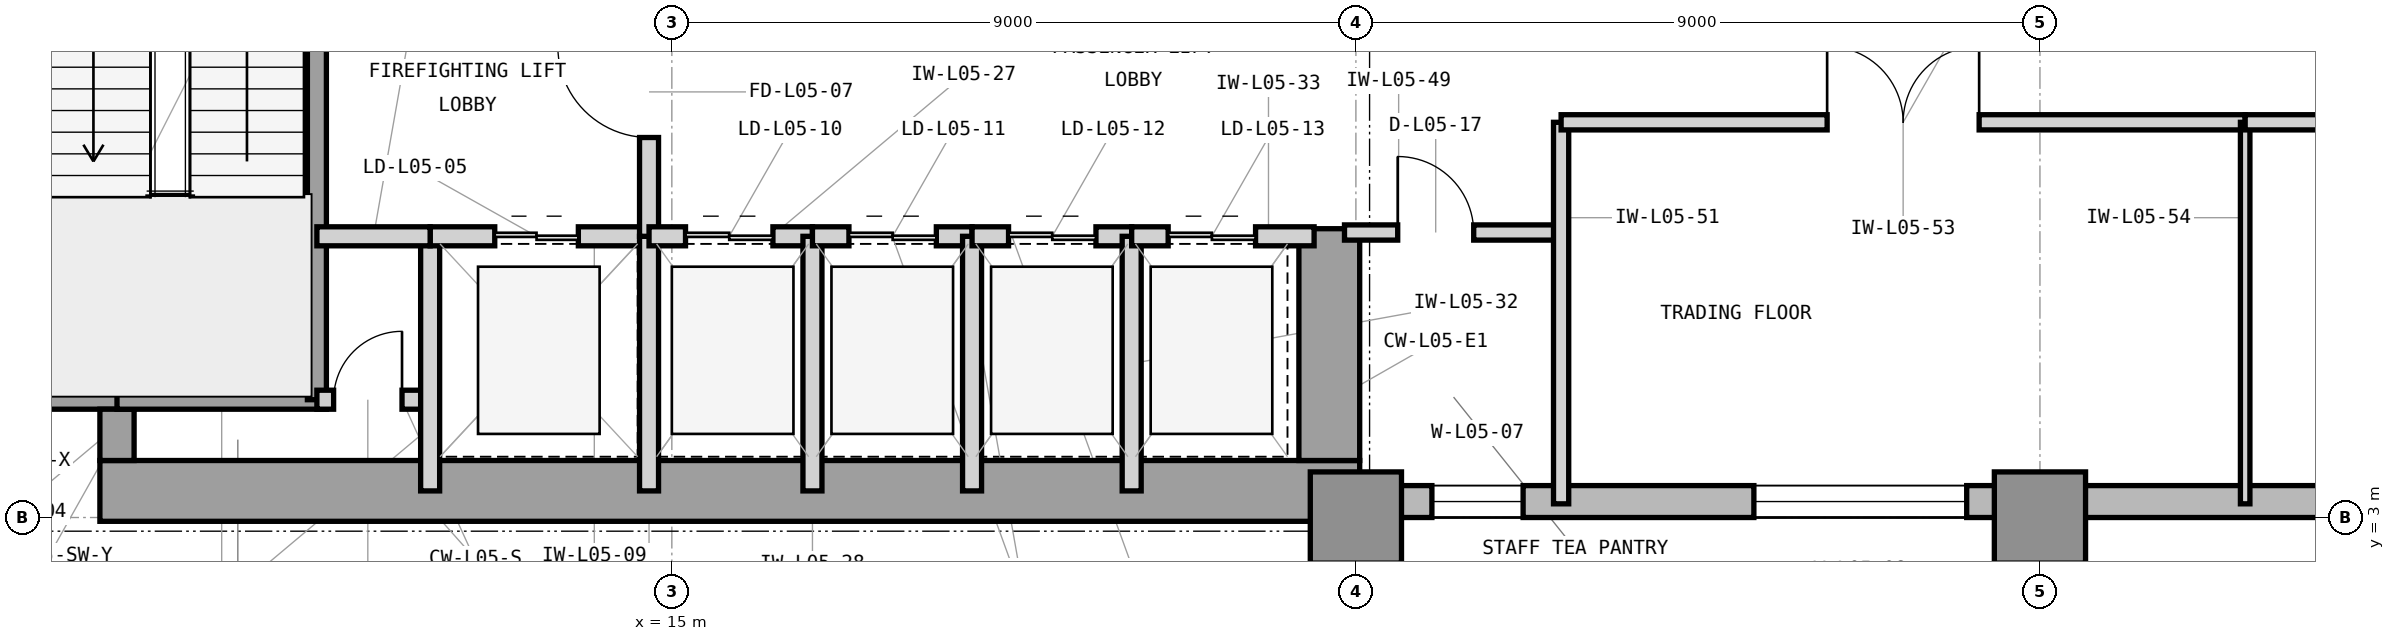
"""IFC4 building model, lengths in metres.
Left out: names, types, materials, properties, quantities, classifications, styles, units other than length and angle.
Written with IfcOpenShell. Run it as: python <this file> out.ifc"""

import sys

from ifc_helpers import new_model, si_unit, direction, frame, frame_2d, origin, origin_2d, place, context, subcontext, project, spatial, rectangle, extrude, element, fill, save


model = new_model("IFC4")
c1 = context("Model", 3, precision=1e-05, world=origin(), true_north=direction((0.0, 1.0)))
c2 = subcontext(c1, "Body", "Model", "MODEL_VIEW")
j1 = project(units=[si_unit("LENGTHUNIT", "METRE"), si_unit("PLANEANGLEUNIT", "RADIAN")], contexts=[c1])
p1 = place(None, origin())
s1 = spatial("IfcSite", under=j1, at=p1, CompositionType="ELEMENT")
p2 = place(p1, origin())
s2 = spatial("IfcBuilding", under=s1, at=p2, CompositionType="ELEMENT")
p3 = place(p2, frame((0.0, 0.0, 25.8)))
s3 = spatial("IfcBuildingStorey", under=s2, at=p3, CompositionType="ELEMENT", Elevation=25.8)
p4 = place(p3, frame((7.475, 3.35, 0.0), z_axis=(0.0, 0.0, 1.0), x_axis=(1.0, 0.0, 0.0)))
e1 = element("IfcWall", 1, at=p4, inside=s3, PredefinedType="SHEAR", context=c2, shape_type="SweptSolid", body=[
    extrude(rectangle(XDim=16.575, YDim=0.8, at=frame_2d((8.288, 0.0))), origin(), (0.0, 0.0, 1.0), 4.2),
])
p5 = place(p3, frame((23.65, 3.75, 0.0), z_axis=(0.0, 0.0, 1.0), x_axis=(0.0, 1.0, 0.0)))
e2 = element("IfcWall", 2, at=p5, inside=s3, PredefinedType="SHEAR", context=c2, shape_type="SweptSolid", body=[
    extrude(rectangle(XDim=3.05, YDim=0.8, at=frame_2d((1.525, 0.0))), origin(), (0.0, 0.0, 1.0), 4.2),
])
p6 = place(p3, frame((6.75, 4.65, 0.0), z_axis=(0.0, 0.0, 1.0), x_axis=(1.0, 0.0, 0.0)))
e3 = element("IfcWall", 3, at=p6, inside=s3, PredefinedType="SHEAR", context=c2, shape_type="SweptSolid", body=[
    extrude(rectangle(XDim=1.175, YDim=0.45, at=frame_2d((0.587, 0.0))), origin(), (0.0, 0.0, 1.0), 4.2),
])
p7 = place(p3, frame((7.7, 3.75, 0.0), z_axis=(0.0, 0.0, 1.0), x_axis=(0.0, 1.0, 0.0)))
e4 = element("IfcWall", 4, at=p7, inside=s3, PredefinedType="SHEAR", context=c2, shape_type="SweptSolid", body=[
    extrude(rectangle(XDim=0.675, YDim=0.45, at=frame_2d((0.337, 0.0))), origin(), (0.0, 0.0, 1.0), 4.2),
])
for number, where, z_axis, x_axis in (
    (5, (24.0, 3.0, 0.0), (0.0, 0.0, 1.0), (1.0, 0.0, 0.0)),
    (6, (33.0, 3.0, 0.0), (0.0, 0.0, 1.0), (1.0, 0.0, 0.0)),
):
    element("IfcColumn", number, at=place(p3, frame(where, z_axis=z_axis, x_axis=x_axis)), inside=s3, PredefinedType="COLUMN", context=c2, shape_type="SweptSolid", body=[
        extrude(rectangle(XDim=1.2, YDim=1.2, at=origin_2d()), origin(), (0.0, 0.0, 1.0), 4.2),
    ])
p8 = place(p3, frame((23.9, 3.21, 0.0), z_axis=(0.0, 0.0, 1.0), x_axis=(1.0, 0.0, 0.0)))
e7 = element("IfcWall", 7, at=p8, inside=s3, PredefinedType="STANDARD", context=c2, shape_type="SweptSolid", body=[
    extrude(rectangle(XDim=40.5, YDim=0.42, at=frame_2d((20.25, 0.0))), origin(), (0.0, 0.0, 1.0), 3.98),
])
p9 = place(p8, frame((1.1, 0.0, 0.85)))
e8 = element("IfcOpeningElement", 8, at=p9, cuts=e7, PredefinedType="OPENING", context=c2, shape_type="SweptSolid", body=[
    extrude(rectangle(XDim=1.2, YDim=2.45, at=frame_2d((0.6, 1.225))), frame((0.0, 0.22, 0.0), z_axis=(0.0, -1.0, 0.0), x_axis=(1.0, 0.0, 0.0)), (0.0, 0.0, 1.0), 0.44),
])
p10 = place(p8, frame((5.336, 0.0, 0.85)))
e9 = element("IfcOpeningElement", 9, at=p10, cuts=e7, PredefinedType="OPENING", context=c2, shape_type="SweptSolid", body=[
    extrude(rectangle(XDim=2.8, YDim=2.45, at=frame_2d((1.4, 1.225))), frame((0.0, 0.22, 0.0), z_axis=(0.0, -1.0, 0.0), x_axis=(1.0, 0.0, 0.0)), (0.0, 0.0, 1.0), 0.44),
])
p11 = place(p8, frame((14.336, 0.0, 0.85)))
e10 = element("IfcOpeningElement", 10, at=p11, cuts=e7, PredefinedType="OPENING", context=c2, shape_type="SweptSolid", body=[
    extrude(rectangle(XDim=2.8, YDim=2.45, at=frame_2d((1.4, 1.225))), frame((0.0, 0.22, 0.0), z_axis=(0.0, -1.0, 0.0), x_axis=(1.0, 0.0, 0.0)), (0.0, 0.0, 1.0), 0.44),
])
p12 = place(p8, frame((21.086, 0.0, 0.85)))
e11 = element("IfcOpeningElement", 11, at=p12, cuts=e7, PredefinedType="OPENING", context=c2, shape_type="SweptSolid", body=[
    extrude(rectangle(XDim=2.1, YDim=2.45, at=frame_2d((1.05, 1.225))), frame((0.0, 0.22, 0.0), z_axis=(0.0, -1.0, 0.0), x_axis=(1.0, 0.0, 0.0)), (0.0, 0.0, 1.0), 0.44),
])
p13 = place(p3, frame((7.7, 4.55, 0.0), z_axis=(0.0, 0.0, 1.0), x_axis=(1.0, 0.0, 0.0)))
e12 = element("IfcWall", 12, at=p13, inside=s3, PredefinedType="SHEAR", context=c2, shape_type="SweptSolid", body=[
    extrude(rectangle(XDim=2.755, YDim=0.25, at=frame_2d((1.377, 0.0))), origin(), (0.0, 0.0, 1.0), 4.2),
])
p14 = place(p3, frame((10.33, 4.55, 0.0), z_axis=(0.0, 0.0, 1.0), x_axis=(0.0, 1.0, 0.0)))
e13 = element("IfcWall", 13, at=p14, inside=s3, PredefinedType="SHEAR", context=c2, shape_type="SweptSolid", body=[
    extrude(rectangle(XDim=7.45, YDim=0.25, at=frame_2d((3.725, 0.0))), origin(), (0.0, 0.0, 1.0), 4.2),
])
p15 = place(p14, frame((5.9, 0.0, 0.0)))
e14 = element("IfcOpeningElement", 14, at=p15, cuts=e13, PredefinedType="OPENING", context=c2, shape_type="SweptSolid", body=[
    extrude(rectangle(XDim=1.25, YDim=2.2, at=frame_2d((0.625, 1.1))), frame((0.0, 0.135, 0.0), z_axis=(0.0, -1.0, 0.0), x_axis=(1.0, 0.0, 0.0)), (0.0, 0.0, 1.0), 0.27),
])
p16 = place(p3, frame((10.33, 4.55, 0.0), z_axis=(0.0, 0.0, 1.0), x_axis=(1.0, 0.0, 0.0)))
e15 = element("IfcWall", 15, at=p16, inside=s3, PredefinedType="PARTITIONING", context=c2, shape_type="SweptSolid", body=[
    extrude(rectangle(XDim=1.49, YDim=0.25, at=frame_2d((0.745, 0.0))), origin(), (0.0, 0.0, 1.0), 3.97),
])
p17 = place(p16, frame((0.22, 0.0, 0.0)))
e16 = element("IfcOpeningElement", 16, at=p17, cuts=e15, PredefinedType="OPENING", context=c2, shape_type="SweptSolid", body=[
    extrude(rectangle(XDim=0.9, YDim=2.1, at=frame_2d((0.45, 1.05))), frame((0.0, 0.135, 0.0), z_axis=(0.0, -1.0, 0.0), x_axis=(1.0, 0.0, 0.0)), (0.0, 0.0, 1.0), 0.27),
])
p18 = place(p3, frame((11.82, 3.35, 0.0), z_axis=(0.0, 0.0, 1.0), x_axis=(0.0, 1.0, 0.0)))
e17 = element("IfcWall", 17, at=p18, inside=s3, PredefinedType="PARTITIONING", context=c2, shape_type="SweptSolid", body=[
    extrude(rectangle(XDim=3.35, YDim=0.25, at=frame_2d((1.675, 0.0))), origin(), (0.0, 0.0, 1.0), 3.97),
])
p19 = place(p3, frame((11.82, 6.7, 0.0), z_axis=(0.0, 0.0, 1.0), x_axis=(1.0, 0.0, 0.0)))
e18 = element("IfcWall", 18, at=p19, inside=s3, PredefinedType="PARTITIONING", context=c2, shape_type="SweptSolid", body=[
    extrude(rectangle(XDim=2.88, YDim=0.25, at=frame_2d((1.44, 0.0))), origin(), (0.0, 0.0, 1.0), 3.426),
])
p20 = place(p19, frame((0.85, 0.0, 0.0)))
e19 = element("IfcOpeningElement", 19, at=p20, cuts=e18, PredefinedType="OPENING", context=c2, shape_type="SweptSolid", body=[
    extrude(rectangle(XDim=1.1, YDim=2.25, at=frame_2d((0.55, 1.125))), frame((0.0, 0.135, 0.0), z_axis=(0.0, -1.0, 0.0), x_axis=(1.0, 0.0, 0.0)), (0.0, 0.0, 1.0), 0.27),
])
p21 = place(p3, frame((14.7, 3.35, 0.0), z_axis=(0.0, 0.0, 1.0), x_axis=(0.0, 1.0, 0.0)))
e20 = element("IfcWall", 20, at=p21, inside=s3, PredefinedType="PARTITIONING", context=c2, shape_type="SweptSolid", body=[
    extrude(rectangle(XDim=3.35, YDim=0.25, at=frame_2d((1.675, 0.0))), origin(), (0.0, 0.0, 1.0), 3.97),
])
p22 = place(p3, frame((14.7, 6.7, 0.0), z_axis=(0.0, 0.0, 1.0), x_axis=(0.0, 1.0, 0.0)))
e21 = element("IfcWall", 21, at=p22, inside=s3, PredefinedType="PARTITIONING", context=c2, shape_type="SweptSolid", body=[
    extrude(rectangle(XDim=3.8, YDim=0.25, at=frame_2d((1.9, 0.0))), origin(), (0.0, 0.0, 1.0), 3.97),
])
p23 = place(p22, frame((1.3, 0.0, 0.0)))
e22 = element("IfcOpeningElement", 22, at=p23, cuts=e21, PredefinedType="OPENING", context=c2, shape_type="SweptSolid", body=[
    extrude(rectangle(XDim=1.2, YDim=2.2, at=frame_2d((0.6, 1.1))), frame((0.0, 0.135, 0.0), z_axis=(0.0, -1.0, 0.0), x_axis=(1.0, 0.0, 0.0)), (0.0, 0.0, 1.0), 0.27),
])
p24 = place(p3, frame((10.33, 6.7, 0.0), z_axis=(0.0, 0.0, 1.0), x_axis=(1.0, 0.0, 0.0)))
e23 = element("IfcWall", 23, at=p24, inside=s3, PredefinedType="PARTITIONING", context=c2, shape_type="SweptSolid", body=[
    extrude(rectangle(XDim=1.49, YDim=0.25, at=frame_2d((0.745, 0.0))), origin(), (0.0, 0.0, 1.0), 3.426),
])
p25 = place(p3, frame((14.7, 6.7, 0.0), z_axis=(0.0, 0.0, 1.0), x_axis=(1.0, 0.0, 0.0)))
e24 = element("IfcWall", 24, at=p25, inside=s3, PredefinedType="PARTITIONING", context=c2, shape_type="SweptSolid", body=[
    extrude(rectangle(XDim=2.15, YDim=0.25, at=frame_2d((1.075, 0.0))), origin(), (0.0, 0.0, 1.0), 3.426),
])
p26 = place(p25, frame((0.48, 0.0, 0.0)))
e25 = element("IfcOpeningElement", 25, at=p26, cuts=e24, PredefinedType="OPENING", context=c2, shape_type="SweptSolid", body=[
    extrude(rectangle(XDim=1.15, YDim=2.25, at=frame_2d((0.575, 1.125))), frame((0.0, 0.135, 0.0), z_axis=(0.0, -1.0, 0.0), x_axis=(1.0, 0.0, 0.0)), (0.0, 0.0, 1.0), 0.27),
])
p27 = place(p3, frame((16.85, 3.35, 0.0), z_axis=(0.0, 0.0, 1.0), x_axis=(0.0, 1.0, 0.0)))
e26 = element("IfcWall", 26, at=p27, inside=s3, PredefinedType="PARTITIONING", context=c2, shape_type="SweptSolid", body=[
    extrude(rectangle(XDim=3.35, YDim=0.25, at=frame_2d((1.675, 0.0))), origin(), (0.0, 0.0, 1.0), 3.97),
])
p28 = place(p3, frame((16.85, 6.7, 0.0), z_axis=(0.0, 0.0, 1.0), x_axis=(1.0, 0.0, 0.0)))
e27 = element("IfcWall", 27, at=p28, inside=s3, PredefinedType="PARTITIONING", context=c2, shape_type="SweptSolid", body=[
    extrude(rectangle(XDim=2.1, YDim=0.25, at=frame_2d((1.05, 0.0))), origin(), (0.0, 0.0, 1.0), 3.426),
])
p29 = place(p28, frame((0.48, 0.0, 0.0)))
e28 = element("IfcOpeningElement", 28, at=p29, cuts=e27, PredefinedType="OPENING", context=c2, shape_type="SweptSolid", body=[
    extrude(rectangle(XDim=1.15, YDim=2.25, at=frame_2d((0.575, 1.125))), frame((0.0, 0.135, 0.0), z_axis=(0.0, -1.0, 0.0), x_axis=(1.0, 0.0, 0.0)), (0.0, 0.0, 1.0), 0.27),
])
p30 = place(p3, frame((18.95, 3.35, 0.0), z_axis=(0.0, 0.0, 1.0), x_axis=(0.0, 1.0, 0.0)))
e29 = element("IfcWall", 29, at=p30, inside=s3, PredefinedType="PARTITIONING", context=c2, shape_type="SweptSolid", body=[
    extrude(rectangle(XDim=3.35, YDim=0.25, at=frame_2d((1.675, 0.0))), origin(), (0.0, 0.0, 1.0), 3.97),
])
p31 = place(p3, frame((18.95, 6.7, 0.0), z_axis=(0.0, 0.0, 1.0), x_axis=(1.0, 0.0, 0.0)))
e30 = element("IfcWall", 30, at=p31, inside=s3, PredefinedType="PARTITIONING", context=c2, shape_type="SweptSolid", body=[
    extrude(rectangle(XDim=2.1, YDim=0.25, at=frame_2d((1.05, 0.0))), origin(), (0.0, 0.0, 1.0), 3.426),
])
p32 = place(p31, frame((0.48, 0.0, 0.0)))
e31 = element("IfcOpeningElement", 31, at=p32, cuts=e30, PredefinedType="OPENING", context=c2, shape_type="SweptSolid", body=[
    extrude(rectangle(XDim=1.15, YDim=2.25, at=frame_2d((0.575, 1.125))), frame((0.0, 0.135, 0.0), z_axis=(0.0, -1.0, 0.0), x_axis=(1.0, 0.0, 0.0)), (0.0, 0.0, 1.0), 0.27),
])
p33 = place(p3, frame((21.05, 3.35, 0.0), z_axis=(0.0, 0.0, 1.0), x_axis=(0.0, 1.0, 0.0)))
e32 = element("IfcWall", 32, at=p33, inside=s3, PredefinedType="PARTITIONING", context=c2, shape_type="SweptSolid", body=[
    extrude(rectangle(XDim=3.35, YDim=0.25, at=frame_2d((1.675, 0.0))), origin(), (0.0, 0.0, 1.0), 3.97),
])
p34 = place(p3, frame((21.05, 6.7, 0.0), z_axis=(0.0, 0.0, 1.0), x_axis=(1.0, 0.0, 0.0)))
e33 = element("IfcWall", 33, at=p34, inside=s3, PredefinedType="PARTITIONING", context=c2, shape_type="SweptSolid", body=[
    extrude(rectangle(XDim=2.4, YDim=0.25, at=frame_2d((1.2, 0.0))), origin(), (0.0, 0.0, 1.0), 3.426),
])
p35 = place(p34, frame((0.48, 0.0, 0.0)))
e34 = element("IfcOpeningElement", 34, at=p35, cuts=e33, PredefinedType="OPENING", context=c2, shape_type="SweptSolid", body=[
    extrude(rectangle(XDim=1.15, YDim=2.25, at=frame_2d((0.575, 1.125))), frame((0.0, 0.135, 0.0), z_axis=(0.0, -1.0, 0.0), x_axis=(1.0, 0.0, 0.0)), (0.0, 0.0, 1.0), 0.27),
])
p36 = place(p3, frame((23.85, 6.75, 0.0), z_axis=(0.0, 0.0, 1.0), x_axis=(1.0, 0.0, 0.0)))
e35 = element("IfcWall", 35, at=p36, inside=s3, PredefinedType="PARTITIONING", context=c2, shape_type="SweptSolid", body=[
    extrude(rectangle(XDim=2.85, YDim=0.2, at=frame_2d((1.425, 0.0))), origin(), (0.0, 0.0, 1.0), 3.97),
])
p37 = place(p36, frame((0.7, 0.0, 0.0)))
e36 = element("IfcOpeningElement", 36, at=p37, cuts=e35, PredefinedType="OPENING", context=c2, shape_type="SweptSolid", body=[
    extrude(rectangle(XDim=1.0, YDim=2.15, at=frame_2d((0.5, 1.075))), frame((0.0, 0.11, 0.0), z_axis=(0.0, -1.0, 0.0), x_axis=(1.0, 0.0, 0.0)), (0.0, 0.0, 1.0), 0.22),
])
p38 = place(p3, frame((26.7, 3.18, 0.0), z_axis=(0.0, 0.0, 1.0), x_axis=(0.0, 1.0, 0.0)))
e37 = element("IfcWall", 37, at=p38, inside=s3, PredefinedType="PARTITIONING", context=c2, shape_type="SweptSolid", body=[
    extrude(rectangle(XDim=5.02, YDim=0.2, at=frame_2d((2.51, 0.0))), origin(), (0.0, 0.0, 1.0), 3.97),
])
p39 = place(p3, frame((26.7, 8.2, 0.0), z_axis=(0.0, 0.0, 1.0), x_axis=(1.0, 0.0, 0.0)))
e38 = element("IfcWall", 38, at=p39, inside=s3, PredefinedType="PARTITIONING", context=c2, shape_type="SweptSolid", body=[
    extrude(rectangle(XDim=9.0, YDim=0.2, at=frame_2d((4.5, 0.0))), origin(), (0.0, 0.0, 1.0), 3.97),
])
p40 = place(p39, frame((3.5, 0.0, 0.0)))
e39 = element("IfcOpeningElement", 39, at=p40, cuts=e38, PredefinedType="OPENING", context=c2, shape_type="SweptSolid", body=[
    extrude(rectangle(XDim=2.0, YDim=2.5, at=frame_2d((1.0, 1.25))), frame((0.0, 0.11, 0.0), z_axis=(0.0, -1.0, 0.0), x_axis=(1.0, 0.0, 0.0)), (0.0, 0.0, 1.0), 0.22),
])
p41 = place(p3, frame((35.7, 3.18, 0.0), z_axis=(0.0, 0.0, 1.0), x_axis=(0.0, 1.0, 0.0)))
e40 = element("IfcWall", 40, at=p41, inside=s3, PredefinedType="PARTITIONING", context=c2, shape_type="SweptSolid", body=[
    extrude(rectangle(XDim=5.02, YDim=0.125, at=frame_2d((2.51, 0.0))), origin(), (0.0, 0.0, 1.0), 3.97),
])
p42 = place(p3, frame((35.7, 8.2, 0.0), z_axis=(0.0, 0.0, 1.0), x_axis=(1.0, 0.0, 0.0)))
e41 = element("IfcWall", 41, at=p42, inside=s3, PredefinedType="PARTITIONING", context=c2, shape_type="SweptSolid", body=[
    extrude(rectangle(XDim=9.0, YDim=0.2, at=frame_2d((4.5, 0.0))), origin(), (0.0, 0.0, 1.0), 3.97),
])
p43 = place(p42, frame((3.5, 0.0, 0.0)))
e42 = element("IfcOpeningElement", 42, at=p43, cuts=e41, PredefinedType="OPENING", context=c2, shape_type="SweptSolid", body=[
    extrude(rectangle(XDim=2.0, YDim=2.5, at=frame_2d((1.0, 1.25))), frame((0.0, 0.11, 0.0), z_axis=(0.0, -1.0, 0.0), x_axis=(1.0, 0.0, 0.0)), (0.0, 0.0, 1.0), 0.22),
])
p44 = place(p17, origin())
e43 = element("IfcDoor", 43, at=p44, inside=s3, OperationType="SINGLE_SWING_RIGHT", PredefinedType="TRAPDOOR", context=c2, shape_type="SweptSolid", body=[
    extrude(rectangle(XDim=0.9, YDim=2.1, at=frame_2d((0.45, 1.05))), frame((0.0, 0.025, 0.0), z_axis=(0.0, -1.0, 0.0), x_axis=(1.0, 0.0, 0.0)), (0.0, 0.0, 1.0), 0.05),
])
fill(e16, e43)
p45 = place(p20, origin())
e44 = element("IfcDoor", 44, at=p45, inside=s3, OperationType="DOUBLE_DOOR_SLIDING", PredefinedType="DOOR", context=c2, shape_type="SweptSolid", body=[
    extrude(rectangle(XDim=1.1, YDim=2.25, at=frame_2d((0.55, 1.125))), frame((0.0, 0.025, 0.0), z_axis=(0.0, -1.0, 0.0), x_axis=(1.0, 0.0, 0.0)), (0.0, 0.0, 1.0), 0.05),
])
fill(e19, e44)
p46 = place(p23, origin())
e45 = element("IfcDoor", 45, at=p46, inside=s3, OperationType="SINGLE_SWING_RIGHT", PredefinedType="DOOR", context=c2, shape_type="SweptSolid", body=[
    extrude(rectangle(XDim=1.2, YDim=2.2, at=frame_2d((0.6, 1.1))), frame((0.0, 0.025, 0.0), z_axis=(0.0, -1.0, 0.0), x_axis=(1.0, 0.0, 0.0)), (0.0, 0.0, 1.0), 0.05),
])
fill(e22, e45)
p47 = place(p26, origin())
e46 = element("IfcDoor", 46, at=p47, inside=s3, OperationType="DOUBLE_DOOR_SLIDING", PredefinedType="DOOR", context=c2, shape_type="SweptSolid", body=[
    extrude(rectangle(XDim=1.15, YDim=2.25, at=frame_2d((0.575, 1.125))), frame((0.0, 0.025, 0.0), z_axis=(0.0, -1.0, 0.0), x_axis=(1.0, 0.0, 0.0)), (0.0, 0.0, 1.0), 0.05),
])
fill(e25, e46)
p48 = place(p29, origin())
e47 = element("IfcDoor", 47, at=p48, inside=s3, OperationType="DOUBLE_DOOR_SLIDING", PredefinedType="DOOR", context=c2, shape_type="SweptSolid", body=[
    extrude(rectangle(XDim=1.15, YDim=2.25, at=frame_2d((0.575, 1.125))), frame((0.0, 0.025, 0.0), z_axis=(0.0, -1.0, 0.0), x_axis=(1.0, 0.0, 0.0)), (0.0, 0.0, 1.0), 0.05),
])
fill(e28, e47)
p49 = place(p32, origin())
e48 = element("IfcDoor", 48, at=p49, inside=s3, OperationType="DOUBLE_DOOR_SLIDING", PredefinedType="DOOR", context=c2, shape_type="SweptSolid", body=[
    extrude(rectangle(XDim=1.15, YDim=2.25, at=frame_2d((0.575, 1.125))), frame((0.0, 0.025, 0.0), z_axis=(0.0, -1.0, 0.0), x_axis=(1.0, 0.0, 0.0)), (0.0, 0.0, 1.0), 0.05),
])
fill(e31, e48)
p50 = place(p35, origin())
e49 = element("IfcDoor", 49, at=p50, inside=s3, OperationType="DOUBLE_DOOR_SLIDING", PredefinedType="DOOR", context=c2, shape_type="SweptSolid", body=[
    extrude(rectangle(XDim=1.15, YDim=2.25, at=frame_2d((0.575, 1.125))), frame((0.0, 0.025, 0.0), z_axis=(0.0, -1.0, 0.0), x_axis=(1.0, 0.0, 0.0)), (0.0, 0.0, 1.0), 0.05),
])
fill(e34, e49)
p51 = place(p37, origin())
e50 = element("IfcDoor", 50, at=p51, inside=s3, OperationType="SINGLE_SWING_LEFT", PredefinedType="DOOR", context=c2, shape_type="SweptSolid", body=[
    extrude(rectangle(XDim=1.0, YDim=2.15, at=frame_2d((0.5, 1.075))), frame((0.0, 0.025, 0.0), z_axis=(0.0, -1.0, 0.0), x_axis=(1.0, 0.0, 0.0)), (0.0, 0.0, 1.0), 0.05),
])
fill(e36, e50)
p52 = place(p40, origin())
e51 = element("IfcDoor", 51, at=p52, inside=s3, OperationType="DOUBLE_DOOR_SINGLE_SWING", PredefinedType="DOOR", context=c2, shape_type="SweptSolid", body=[
    extrude(rectangle(XDim=2.0, YDim=2.5, at=frame_2d((1.0, 1.25))), frame((0.0, 0.025, 0.0), z_axis=(0.0, -1.0, 0.0), x_axis=(1.0, 0.0, 0.0)), (0.0, 0.0, 1.0), 0.05),
])
fill(e39, e51)
p53 = place(p9, origin())
e52 = element("IfcWindow", 52, at=p53, inside=s3, PartitioningType="SINGLE_PANEL", PredefinedType="WINDOW", context=c2, shape_type="SweptSolid", body=[
    extrude(rectangle(XDim=1.2, YDim=2.45, at=frame_2d((0.6, 1.225))), frame((0.0, 0.11, 0.0), z_axis=(0.0, -1.0, 0.0), x_axis=(1.0, 0.0, 0.0)), (0.0, 0.0, 1.0), 0.06),
])
fill(e8, e52)
p54 = place(p10, origin())
e53 = element("IfcWindow", 53, at=p54, inside=s3, PartitioningType="SINGLE_PANEL", PredefinedType="WINDOW", context=c2, shape_type="SweptSolid", body=[
    extrude(rectangle(XDim=2.8, YDim=2.45, at=frame_2d((1.4, 1.225))), frame((0.0, 0.11, 0.0), z_axis=(0.0, -1.0, 0.0), x_axis=(1.0, 0.0, 0.0)), (0.0, 0.0, 1.0), 0.06),
])
fill(e9, e53)
save(model, sys.argv[1])
